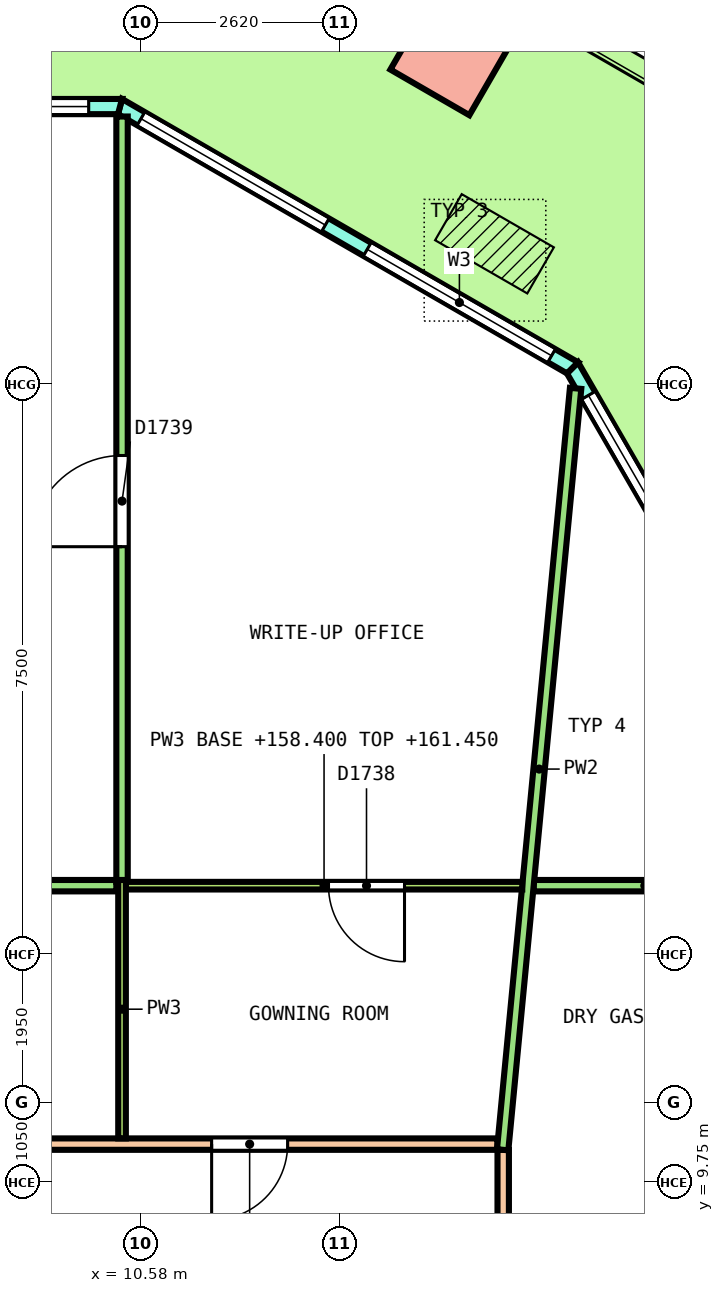
"""IFC4 building model, lengths in metres.
Left out: names, types, materials, properties, quantities, classifications, styles, units other than length and angle.
Written with IfcOpenShell. Run it as: python <this file> out.ifc"""

import sys

from ifc_helpers import new_model, si_unit, direction, frame, frame_2d, origin, origin_2d, place, context, subcontext, project, spatial, polyline, rectangle, outline, extrude, element, fill, save


model = new_model("IFC4")
c1 = context("Model", 3, precision=1e-05, world=origin(), true_north=direction((0.0, 1.0)))
c2 = subcontext(c1, "Body", "Model", "MODEL_VIEW")
j1 = project(units=[si_unit("LENGTHUNIT", "METRE"), si_unit("PLANEANGLEUNIT", "RADIAN")], contexts=[c1])
p1 = place(None, origin())
s1 = spatial("IfcSite", under=j1, at=p1, CompositionType="ELEMENT")
p2 = place(p1, origin())
s2 = spatial("IfcBuilding", under=s1, at=p2, CompositionType="ELEMENT")
p3 = place(p2, frame((0.0, 0.0, 158.4)))
s3 = spatial("IfcBuildingStorey", under=s2, at=p3, CompositionType="ELEMENT", Elevation=158.4)
p4 = place(p3, frame((14.685, 24.606, 0.0), z_axis=(0.036325398096, 0.0, 0.999340014936), x_axis=(-0.865311654478, 0.500246354177, 0.031453549198)))
e1 = element("IfcColumn", 1, at=p4, inside=s3, PredefinedType="COLUMN", context=c2, shape_type="SweptSolid", body=[
    extrude(rectangle(XDim=1.2, YDim=1.2, at=origin_2d()), origin(), (0.0, 0.0, 1.0), 4.053),
])
p5 = place(p3, frame((25.852, 3.852, 0.0), z_axis=(0.0, 0.0, 1.0), x_axis=(-0.499998279088, 0.866026397351, 0.0)))
e2 = element("IfcWall", 2, at=p5, inside=s3, PredefinedType="SOLIDWALL", context=c2, shape_type="SweptSolid", body=[
    extrude(outline(polyline([(-0.027, -0.1), (0.985, -0.1), (1.998, -0.1), (3.01, -0.1), (4.022, -0.1), (5.035, -0.1), (6.047, -0.1), (7.059, -0.1), (8.072, -0.1), (9.084, -0.1), (10.096, -0.1), (11.109, -0.1), (12.121, -0.1), (13.133, -0.1), (14.146, -0.1), (15.158, -0.1), (16.17, -0.1), (17.182, -0.1), (18.195, -0.1), (19.207, -0.1), (19.153, 0.1), (18.147, 0.1), (17.14, 0.1), (16.133, 0.1), (15.127, 0.1), (14.12, 0.1), (13.113, 0.1), (12.107, 0.1), (11.1, 0.1), (10.094, 0.1), (9.087, 0.1), (8.08, 0.1), (7.073, 0.1), (6.067, 0.1), (5.06, 0.1), (4.053, 0.1), (3.047, 0.1), (2.04, 0.1), (1.033, 0.1), (0.027, 0.1), (-0.027, -0.1)])), origin(), (0.0, 0.0, 1.0), 4.1),
])
p6 = place(p5, frame((0.418, 0.0, 0.1)))
e3 = element("IfcOpeningElement", 3, at=p6, cuts=e2, PredefinedType="OPENING", context=c2, shape_type="SweptSolid", body=[
    extrude(rectangle(XDim=3.0, YDim=2.9, at=frame_2d((1.5, 1.45))), frame((0.0, 0.11, 0.0), z_axis=(0.0, -1.0, 0.0), x_axis=(1.0, 0.0, 0.0)), (0.0, 0.0, 1.0), 0.22),
])
p7 = place(p5, frame((4.254, 0.0, 0.1)))
e4 = element("IfcOpeningElement", 4, at=p7, cuts=e2, PredefinedType="OPENING", context=c2, shape_type="SweptSolid", body=[
    extrude(rectangle(XDim=3.0, YDim=2.9, at=frame_2d((1.5, 1.45))), frame((0.0, 0.11, 0.0), z_axis=(0.0, -1.0, 0.0), x_axis=(1.0, 0.0, 0.0)), (0.0, 0.0, 1.0), 0.22),
])
p8 = place(p5, frame((8.69, 0.0, 0.0)))
e5 = element("IfcOpeningElement", 5, at=p8, cuts=e2, PredefinedType="OPENING", context=c2, shape_type="SweptSolid", body=[
    extrude(rectangle(XDim=1.8, YDim=2.4, at=frame_2d((0.9, 1.2))), frame((0.0, 0.11, 0.0), z_axis=(0.0, -1.0, 0.0), x_axis=(1.0, 0.0, 0.0)), (0.0, 0.0, 1.0), 0.22),
])
p9 = place(p5, frame((8.69, 0.0, 2.55)))
e6 = element("IfcOpeningElement", 6, at=p9, cuts=e2, PredefinedType="OPENING", context=c2, shape_type="SweptSolid", body=[
    extrude(rectangle(XDim=1.8, YDim=0.45, at=frame_2d((0.9, 0.225))), frame((0.0, 0.11, 0.0), z_axis=(0.0, -1.0, 0.0), x_axis=(1.0, 0.0, 0.0)), (0.0, 0.0, 1.0), 0.22),
])
p10 = place(p5, frame((11.926, 0.0, 0.1)))
e7 = element("IfcOpeningElement", 7, at=p10, cuts=e2, PredefinedType="OPENING", context=c2, shape_type="SweptSolid", body=[
    extrude(rectangle(XDim=3.0, YDim=2.9, at=frame_2d((1.5, 1.45))), frame((0.0, 0.11, 0.0), z_axis=(0.0, -1.0, 0.0), x_axis=(1.0, 0.0, 0.0)), (0.0, 0.0, 1.0), 0.22),
])
p11 = place(p5, frame((15.762, 0.0, 0.1)))
e8 = element("IfcOpeningElement", 8, at=p11, cuts=e2, PredefinedType="OPENING", context=c2, shape_type="SweptSolid", body=[
    extrude(rectangle(XDim=3.0, YDim=2.9, at=frame_2d((1.5, 1.45))), frame((0.0, 0.11, 0.0), z_axis=(0.0, -1.0, 0.0), x_axis=(1.0, 0.0, 0.0)), (0.0, 0.0, 1.0), 0.22),
])
p12 = place(p3, frame((16.262, 20.463, 0.0), z_axis=(0.0, 0.0, 1.0), x_axis=(-0.866029458321, 0.49999297727, 0.0)))
e9 = element("IfcWall", 9, at=p12, inside=s3, PredefinedType="SOLIDWALL", context=c2, shape_type="SweptSolid", body=[
    extrude(outline(polyline([(-0.027, -0.1), (1.128, -0.1), (2.282, -0.1), (3.437, -0.1), (4.592, -0.1), (5.747, -0.1), (6.901, -0.1), (6.848, 0.1), (5.711, 0.1), (4.574, 0.1), (3.437, 0.1), (2.301, 0.1), (1.164, 0.1), (0.027, 0.1), (-0.027, -0.1)])), origin(), (0.0, 0.0, 1.0), 4.1),
])
p13 = place(p12, frame((0.319, 0.0, 0.1)))
e10 = element("IfcOpeningElement", 10, at=p13, cuts=e9, PredefinedType="OPENING", context=c2, shape_type="SweptSolid", body=[
    extrude(rectangle(XDim=2.8, YDim=2.9, at=frame_2d((1.4, 1.45))), frame((0.0, 0.11, 0.0), z_axis=(0.0, -1.0, 0.0), x_axis=(1.0, 0.0, 0.0)), (0.0, 0.0, 1.0), 0.22),
])
p14 = place(p12, frame((3.756, 0.0, 0.1)))
e11 = element("IfcOpeningElement", 11, at=p14, cuts=e9, PredefinedType="OPENING", context=c2, shape_type="SweptSolid", body=[
    extrude(rectangle(XDim=2.8, YDim=2.9, at=frame_2d((1.4, 1.45))), frame((0.0, 0.11, 0.0), z_axis=(0.0, -1.0, 0.0), x_axis=(1.0, 0.0, 0.0)), (0.0, 0.0, 1.0), 0.22),
])
p15 = place(p3, frame((10.309, 23.9, 0.0), z_axis=(0.0, 0.0, 1.0), x_axis=(-1.0, 0.0, 0.0)))
e12 = element("IfcWall", 12, at=p15, inside=s3, PredefinedType="SOLIDWALL", context=c2, shape_type="SweptSolid", body=[
    extrude(outline(polyline([(-0.027, -0.1), (1.007, -0.1), (2.04, -0.1), (3.074, -0.1), (4.107, -0.1), (5.141, -0.1), (6.174, -0.1), (7.208, -0.1), (8.241, -0.1), (9.275, -0.1), (10.309, -0.1), (11.342, -0.1), (12.376, -0.1), (13.409, -0.1), (14.443, -0.1), (15.476, -0.1), (16.51, -0.1), (17.543, -0.1), (18.577, -0.1), (19.611, -0.1), (20.644, -0.1), (20.59, 0.1), (19.562, 0.1), (18.534, 0.1), (17.506, 0.1), (16.478, 0.1), (15.449, 0.1), (14.421, 0.1), (13.393, 0.1), (12.365, 0.1), (11.337, 0.1), (10.309, 0.1), (9.281, 0.1), (8.252, 0.1), (7.224, 0.1), (6.196, 0.1), (5.168, 0.1), (4.14, 0.1), (3.111, 0.1), (2.083, 0.1), (1.055, 0.1), (0.027, 0.1), (-0.027, -0.1)])), origin(), (0.0, 0.0, 1.0), 4.1),
])
p16 = place(p15, frame((0.412, 0.0, 0.1)))
e13 = element("IfcOpeningElement", 13, at=p16, cuts=e12, PredefinedType="OPENING", context=c2, shape_type="SweptSolid", body=[
    extrude(rectangle(XDim=3.3, YDim=2.9, at=frame_2d((1.65, 1.45))), frame((0.0, 0.11, 0.0), z_axis=(0.0, -1.0, 0.0), x_axis=(1.0, 0.0, 0.0)), (0.0, 0.0, 1.0), 0.22),
])
p17 = place(p15, frame((4.535, 0.0, 0.1)))
e14 = element("IfcOpeningElement", 14, at=p17, cuts=e12, PredefinedType="OPENING", context=c2, shape_type="SweptSolid", body=[
    extrude(rectangle(XDim=3.3, YDim=2.9, at=frame_2d((1.65, 1.45))), frame((0.0, 0.11, 0.0), z_axis=(0.0, -1.0, 0.0), x_axis=(1.0, 0.0, 0.0)), (0.0, 0.0, 1.0), 0.22),
])
p18 = place(p15, frame((9.409, 0.0, 0.0)))
e15 = element("IfcOpeningElement", 15, at=p18, cuts=e12, PredefinedType="OPENING", context=c2, shape_type="SweptSolid", body=[
    extrude(rectangle(XDim=1.8, YDim=2.4, at=frame_2d((0.9, 1.2))), frame((0.0, 0.11, 0.0), z_axis=(0.0, -1.0, 0.0), x_axis=(1.0, 0.0, 0.0)), (0.0, 0.0, 1.0), 0.22),
])
p19 = place(p15, frame((9.409, 0.0, 2.55)))
e16 = element("IfcOpeningElement", 16, at=p19, cuts=e12, PredefinedType="OPENING", context=c2, shape_type="SweptSolid", body=[
    extrude(rectangle(XDim=1.8, YDim=0.45, at=frame_2d((0.9, 0.225))), frame((0.0, 0.11, 0.0), z_axis=(0.0, -1.0, 0.0), x_axis=(1.0, 0.0, 0.0)), (0.0, 0.0, 1.0), 0.22),
])
p20 = place(p15, frame((12.782, 0.0, 0.1)))
e17 = element("IfcOpeningElement", 17, at=p20, cuts=e12, PredefinedType="OPENING", context=c2, shape_type="SweptSolid", body=[
    extrude(rectangle(XDim=3.3, YDim=2.9, at=frame_2d((1.65, 1.45))), frame((0.0, 0.11, 0.0), z_axis=(0.0, -1.0, 0.0), x_axis=(1.0, 0.0, 0.0)), (0.0, 0.0, 1.0), 0.22),
])
p21 = place(p15, frame((16.906, 0.0, 0.1)))
e18 = element("IfcOpeningElement", 18, at=p21, cuts=e12, PredefinedType="OPENING", context=c2, shape_type="SweptSolid", body=[
    extrude(rectangle(XDim=3.3, YDim=2.9, at=frame_2d((1.65, 1.45))), frame((0.0, 0.11, 0.0), z_axis=(0.0, -1.0, 0.0), x_axis=(1.0, 0.0, 0.0)), (0.0, 0.0, 1.0), 0.22),
])
p22 = place(p3, frame((15.35, -0.392, 0.0), z_axis=(0.0, 0.0, 1.0), x_axis=(0.0, 1.0, 0.0)))
e19 = element("IfcWall", 19, at=p22, inside=s3, PredefinedType="PARTITIONING", context=c2, shape_type="SweptSolid", body=[
    extrude(rectangle(XDim=10.567, YDim=0.15, at=frame_2d((5.284, 0.0))), origin(), (0.0, 0.0, 1.0), 3.05),
])
p23 = place(p22, frame((8.288, 0.0, 0.0)))
e20 = element("IfcOpeningElement", 20, at=p23, cuts=e19, PredefinedType="OPENING", context=c2, shape_type="SweptSolid", body=[
    extrude(rectangle(XDim=1.0, YDim=2.1, at=frame_2d((0.5, 1.05))), frame((0.0, 0.085, 0.0), z_axis=(0.0, -1.0, 0.0), x_axis=(1.0, 0.0, 0.0)), (0.0, 0.0, 1.0), 0.17),
])
p24 = place(p3, frame((-15.275, 10.25, 0.0), z_axis=(0.0, 0.0, 1.0), x_axis=(1.0, 0.0, 0.0)))
e21 = element("IfcWall", 21, at=p24, inside=s3, PredefinedType="PARTITIONING", context=c2, shape_type="SweptSolid", body=[
    extrude(rectangle(XDim=30.55, YDim=0.15, at=frame_2d((15.275, 0.0))), origin(), (0.0, 0.0, 1.0), 3.05),
])
p25 = place(p24, frame((26.789, 0.0, 0.0)))
e22 = element("IfcOpeningElement", 22, at=p25, cuts=e21, PredefinedType="OPENING", context=c2, shape_type="SweptSolid", body=[
    extrude(rectangle(XDim=1.0, YDim=2.1, at=frame_2d((0.5, 1.05))), frame((0.0, 0.085, 0.0), z_axis=(0.0, -1.0, 0.0), x_axis=(1.0, 0.0, 0.0)), (0.0, 0.0, 1.0), 0.17),
])
p26 = place(p24, frame((14.675, 0.0, 0.0)))
e23 = element("IfcOpeningElement", 23, at=p26, cuts=e21, PredefinedType="OPENING", context=c2, shape_type="SweptSolid", body=[
    extrude(rectangle(XDim=1.2, YDim=2.1, at=frame_2d((0.6, 1.05))), frame((0.0, 0.085, 0.0), z_axis=(0.0, -1.0, 0.0), x_axis=(1.0, 0.0, 0.0)), (0.0, 0.0, 1.0), 0.17),
])
p27 = place(p24, frame((2.429, 0.0, 0.0)))
e24 = element("IfcOpeningElement", 24, at=p27, cuts=e21, PredefinedType="OPENING", context=c2, shape_type="SweptSolid", body=[
    extrude(rectangle(XDim=1.0, YDim=2.1, at=frame_2d((0.5, 1.05))), frame((0.0, 0.085, 0.0), z_axis=(0.0, -1.0, 0.0), x_axis=(1.0, 0.0, 0.0)), (0.0, 0.0, 1.0), 0.17),
])
p28 = place(p3, frame((-16.697, 13.65, 0.0), z_axis=(0.0, 0.0, 1.0), x_axis=(1.0, 0.0, 0.0)))
e25 = element("IfcWall", 25, at=p28, inside=s3, PredefinedType="PARTITIONING", context=c2, shape_type="SweptSolid", body=[
    extrude(rectangle(XDim=26.958, YDim=0.15, at=frame_2d((13.479, 0.0))), origin(), (0.0, 0.0, 1.0), 3.05),
])
p29 = place(p3, frame((15.751, 13.65, 0.0), z_axis=(0.0, 0.0, 1.0), x_axis=(1.0, 0.0, 0.0)))
e26 = element("IfcWall", 26, at=p29, inside=s3, PredefinedType="PARTITIONING", context=c2, shape_type="SweptSolid", body=[
    extrude(rectangle(XDim=2.924, YDim=0.15, at=frame_2d((1.462, 0.0))), origin(), (0.0, 0.0, 1.0), 4.1),
])
p30 = place(p3, frame((15.343, 10.175, 0.0), z_axis=(0.0, 0.0, 1.0), x_axis=(0.095366624926, 0.995442216731, 0.0)))
e27 = element("IfcWall", 27, at=p30, inside=s3, PredefinedType="PARTITIONING", context=c2, shape_type="SweptSolid", body=[
    extrude(rectangle(XDim=10.063, YDim=0.15, at=frame_2d((5.032, 0.0))), origin(), (0.0, 0.0, 1.0), 3.05),
])
p31 = place(p3, frame((10.335, 13.7, 0.0), z_axis=(0.0, 0.0, 1.0), x_axis=(0.0, 1.0, 0.0)))
e28 = element("IfcWall", 28, at=p31, inside=s3, PredefinedType="PARTITIONING", context=c2, shape_type="SweptSolid", body=[
    extrude(rectangle(XDim=10.069, YDim=0.15, at=frame_2d((5.035, 0.0))), origin(), (0.0, 0.0, 1.0), 3.05),
])
p32 = place(p31, frame((4.409, 0.0, 0.0)))
e29 = element("IfcOpeningElement", 29, at=p32, cuts=e28, PredefinedType="OPENING", context=c2, shape_type="SweptSolid", body=[
    extrude(rectangle(XDim=1.2, YDim=2.1, at=frame_2d((0.6, 1.05))), frame((0.0, 0.085, 0.0), z_axis=(0.0, -1.0, 0.0), x_axis=(1.0, 0.0, 0.0)), (0.0, 0.0, 1.0), 0.17),
])
p33 = place(p3, frame((10.385, 13.65, 0.0), z_axis=(0.0, 0.0, 1.0), x_axis=(1.0, 0.0, 0.0)))
e30 = element("IfcWall", 30, at=p33, inside=s3, PredefinedType="PARTITIONING", context=c2, shape_type="SweptSolid", body=[
    extrude(rectangle(XDim=5.215, YDim=0.1, at=frame_2d((2.607, 0.0))), origin(), (0.0, 0.0, 1.0), 3.05),
])
p34 = place(p33, frame((2.666, 0.0, 0.0)))
e31 = element("IfcOpeningElement", 31, at=p34, cuts=e30, PredefinedType="OPENING", context=c2, shape_type="SweptSolid", body=[
    extrude(rectangle(XDim=1.0, YDim=2.1, at=frame_2d((0.5, 1.05))), frame((0.0, 0.06, 0.0), z_axis=(0.0, -1.0, 0.0), x_axis=(1.0, 0.0, 0.0)), (0.0, 0.0, 1.0), 0.12),
])
p35 = place(p3, frame((10.335, 10.325, 0.0), z_axis=(0.0, 0.0, 1.0), x_axis=(0.0, 1.0, 0.0)))
e32 = element("IfcWall", 32, at=p35, inside=s3, PredefinedType="PARTITIONING", context=c2, shape_type="SweptSolid", body=[
    extrude(rectangle(XDim=3.4, YDim=0.1, at=frame_2d((1.7, 0.0))), origin(), (0.0, 0.0, 1.0), 3.05),
])
p36 = place(p11, origin())
e33 = element("IfcWindow", 33, at=p36, inside=s3, PartitioningType="SINGLE_PANEL", PredefinedType="WINDOW", context=c2, shape_type="SweptSolid", body=[
    extrude(rectangle(XDim=3.0, YDim=2.9, at=frame_2d((1.5, 1.45))), frame((0.0, 0.03, 0.0), z_axis=(0.0, -1.0, 0.0), x_axis=(1.0, 0.0, 0.0)), (0.0, 0.0, 1.0), 0.06),
])
fill(e8, e33)
p37 = place(p13, origin())
e34 = element("IfcWindow", 34, at=p37, inside=s3, PartitioningType="SINGLE_PANEL", PredefinedType="WINDOW", context=c2, shape_type="SweptSolid", body=[
    extrude(rectangle(XDim=2.8, YDim=2.9, at=frame_2d((1.4, 1.45))), frame((0.0, 0.03, 0.0), z_axis=(0.0, -1.0, 0.0), x_axis=(1.0, 0.0, 0.0)), (0.0, 0.0, 1.0), 0.06),
])
fill(e10, e34)
p38 = place(p14, origin())
e35 = element("IfcWindow", 35, at=p38, inside=s3, PartitioningType="SINGLE_PANEL", PredefinedType="WINDOW", context=c2, shape_type="SweptSolid", body=[
    extrude(rectangle(XDim=2.8, YDim=2.9, at=frame_2d((1.4, 1.45))), frame((0.0, 0.03, 0.0), z_axis=(0.0, -1.0, 0.0), x_axis=(1.0, 0.0, 0.0)), (0.0, 0.0, 1.0), 0.06),
])
fill(e11, e35)
p39 = place(p16, origin())
e36 = element("IfcWindow", 36, at=p39, inside=s3, PartitioningType="SINGLE_PANEL", PredefinedType="WINDOW", context=c2, shape_type="SweptSolid", body=[
    extrude(rectangle(XDim=3.3, YDim=2.9, at=frame_2d((1.65, 1.45))), frame((0.0, 0.03, 0.0), z_axis=(0.0, -1.0, 0.0), x_axis=(1.0, 0.0, 0.0)), (0.0, 0.0, 1.0), 0.06),
])
fill(e13, e36)
p40 = place(p25, origin())
e37 = element("IfcDoor", 37, at=p40, inside=s3, OperationType="SINGLE_SWING_RIGHT", PredefinedType="DOOR", context=c2, shape_type="SweptSolid", body=[
    extrude(rectangle(XDim=1.0, YDim=2.1, at=frame_2d((0.5, 1.05))), frame((0.0, 0.025, 0.0), z_axis=(0.0, -1.0, 0.0), x_axis=(1.0, 0.0, 0.0)), (0.0, 0.0, 1.0), 0.05),
])
fill(e22, e37)
p41 = place(p34, origin())
e38 = element("IfcDoor", 38, at=p41, inside=s3, OperationType="SINGLE_SWING_LEFT", PredefinedType="DOOR", context=c2, shape_type="SweptSolid", body=[
    extrude(rectangle(XDim=1.0, YDim=2.1, at=frame_2d((0.5, 1.05))), frame((0.0, 0.025, 0.0), z_axis=(0.0, -1.0, 0.0), x_axis=(1.0, 0.0, 0.0)), (0.0, 0.0, 1.0), 0.05),
])
fill(e31, e38)
p42 = place(p32, origin())
e39 = element("IfcDoor", 39, at=p42, inside=s3, OperationType="DOUBLE_DOOR_SINGLE_SWING", PredefinedType="DOOR", context=c2, shape_type="SweptSolid", body=[
    extrude(rectangle(XDim=1.2, YDim=2.1, at=frame_2d((0.6, 1.05))), frame((0.0, 0.025, 0.0), z_axis=(0.0, -1.0, 0.0), x_axis=(1.0, 0.0, 0.0)), (0.0, 0.0, 1.0), 0.05),
])
fill(e29, e39)
save(model, sys.argv[1])
